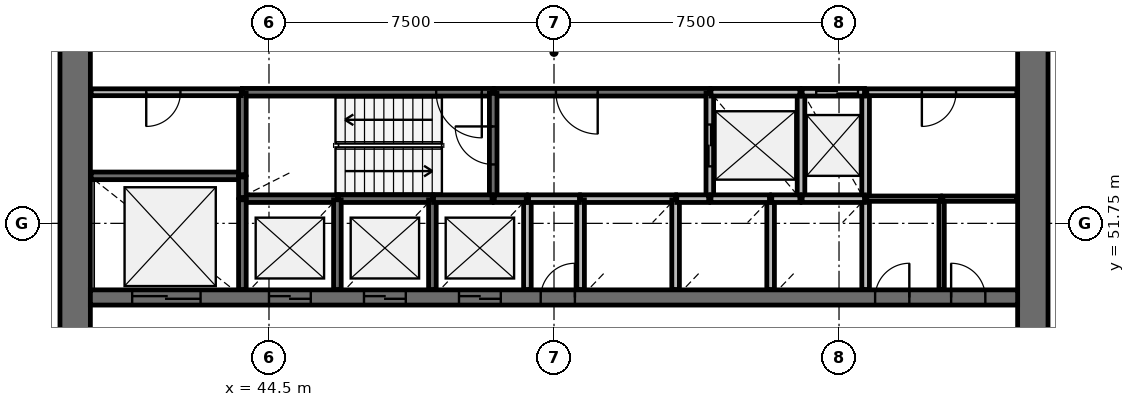
"""IFC4 building model, lengths in metres.
Left out: names, types, materials, properties, quantities, classifications, styles, units other than length and angle.
Written with IfcOpenShell. Run it as: python <this file> out.ifc"""

import sys

from ifc_helpers import new_model, si_unit, direction, frame, frame_2d, origin, place, context, subcontext, project, spatial, rectangle, extrude, source, transform, mapped, element, fill, save


model = new_model("IFC4")
c1 = context("Model", 3, precision=1e-05, world=origin(), true_north=direction((0.0, 1.0)))
c2 = subcontext(c1, "Body", "Model", "MODEL_VIEW")
j1 = project(units=[si_unit("LENGTHUNIT", "METRE"), si_unit("PLANEANGLEUNIT", "RADIAN")], contexts=[c1])
p1 = place(None, origin())
s1 = spatial("IfcSite", under=j1, at=p1, CompositionType="ELEMENT")
p2 = place(p1, origin())
s2 = spatial("IfcBuilding", under=s1, at=p2, CompositionType="ELEMENT")
p3 = place(p2, frame((0.0, 0.0, 112.6)))
s3 = spatial("IfcBuildingStorey", under=s2, at=p3, CompositionType="ELEMENT", Elevation=112.6)
p4 = place(p3, frame((64.6, 38.0, 0.0), z_axis=(0.0, 0.0, 1.0), x_axis=(0.0, 1.0, 0.0)))
e1 = element("IfcWall", 1, at=p4, inside=s3, PredefinedType="SHEAR", context=c2, shape_type="SweptSolid", body=[
    extrude(rectangle(XDim=20.0, YDim=0.8, at=frame_2d((10.0, 0.0))), origin(), (0.0, 0.0, 1.0), 4.1),
])
p5 = place(p4, frame((9.1, 0.0, 0.0)))
e2 = element("IfcOpeningElement", 2, at=p5, cuts=e1, PredefinedType="OPENING", context=c2, shape_type="SweptSolid", body=[
    extrude(rectangle(XDim=1.8, YDim=2.1, at=frame_2d((0.9, 1.05))), frame((0.0, 0.41, 0.0), z_axis=(0.0, -1.0, 0.0), x_axis=(1.0, 0.0, 0.0)), (0.0, 0.0, 1.0), 0.82),
])
p6 = place(p3, frame((39.4, 58.0, 0.0), z_axis=(0.0, 0.0, 1.0), x_axis=(0.0, -1.0, 0.0)))
e3 = element("IfcWall", 3, at=p6, inside=s3, PredefinedType="SHEAR", context=c2, shape_type="SweptSolid", body=[
    extrude(rectangle(XDim=20.0, YDim=0.8, at=frame_2d((10.0, 0.0))), origin(), (0.0, 0.0, 1.0), 4.1),
])
p7 = place(p6, frame((9.1, 0.0, 0.0)))
e4 = element("IfcOpeningElement", 4, at=p7, cuts=e3, PredefinedType="OPENING", context=c2, shape_type="SweptSolid", body=[
    extrude(rectangle(XDim=1.8, YDim=2.1, at=frame_2d((0.9, 1.05))), frame((0.0, 0.41, 0.0), z_axis=(0.0, -1.0, 0.0), x_axis=(1.0, 0.0, 0.0)), (0.0, 0.0, 1.0), 0.82),
])
p8 = place(p3, frame((39.8, 49.8, 0.0), z_axis=(0.0, 0.0, 1.0), x_axis=(1.0, 0.0, 0.0)))
e5 = element("IfcWall", 5, at=p8, inside=s3, PredefinedType="SHEAR", context=c2, shape_type="SweptSolid", body=[
    extrude(rectangle(XDim=24.4, YDim=0.4, at=frame_2d((12.2, 0.0))), origin(), (0.0, 0.0, 1.0), 4.1),
])
p9 = place(p8, frame((4.7, 0.0, 0.0)))
e6 = element("IfcOpeningElement", 6, at=p9, cuts=e5, PredefinedType="OPENING", context=c2, shape_type="SweptSolid", body=[
    extrude(rectangle(XDim=1.1, YDim=2.1, at=frame_2d((0.55, 1.05))), frame((0.0, 0.21, 0.0), z_axis=(0.0, -1.0, 0.0), x_axis=(1.0, 0.0, 0.0)), (0.0, 0.0, 1.0), 0.42),
])
p10 = place(p8, frame((7.2, 0.0, 0.0)))
e7 = element("IfcOpeningElement", 7, at=p10, cuts=e5, PredefinedType="OPENING", context=c2, shape_type="SweptSolid", body=[
    extrude(rectangle(XDim=1.1, YDim=2.1, at=frame_2d((0.55, 1.05))), frame((0.0, 0.21, 0.0), z_axis=(0.0, -1.0, 0.0), x_axis=(1.0, 0.0, 0.0)), (0.0, 0.0, 1.0), 0.42),
])
p11 = place(p8, frame((9.7, 0.0, 0.0)))
e8 = element("IfcOpeningElement", 8, at=p11, cuts=e5, PredefinedType="OPENING", context=c2, shape_type="SweptSolid", body=[
    extrude(rectangle(XDim=1.1, YDim=2.1, at=frame_2d((0.55, 1.05))), frame((0.0, 0.21, 0.0), z_axis=(0.0, -1.0, 0.0), x_axis=(1.0, 0.0, 0.0)), (0.0, 0.0, 1.0), 0.42),
])
p12 = place(p8, frame((1.1, 0.0, 0.0)))
e9 = element("IfcOpeningElement", 9, at=p12, cuts=e5, PredefinedType="OPENING", context=c2, shape_type="SweptSolid", body=[
    extrude(rectangle(XDim=1.8, YDim=2.4, at=frame_2d((0.9, 1.2))), frame((0.0, 0.21, 0.0), z_axis=(0.0, -1.0, 0.0), x_axis=(1.0, 0.0, 0.0)), (0.0, 0.0, 1.0), 0.42),
])
p13 = place(p8, frame((20.65, 0.0, 0.0)))
e10 = element("IfcOpeningElement", 10, at=p13, cuts=e5, PredefinedType="OPENING", context=c2, shape_type="SweptSolid", body=[
    extrude(rectangle(XDim=0.9, YDim=2.1, at=frame_2d((0.45, 1.05))), frame((0.0, 0.21, 0.0), z_axis=(0.0, -1.0, 0.0), x_axis=(1.0, 0.0, 0.0)), (0.0, 0.0, 1.0), 0.42),
])
p14 = place(p8, frame((22.65, 0.0, 0.0)))
e11 = element("IfcOpeningElement", 11, at=p14, cuts=e5, PredefinedType="OPENING", context=c2, shape_type="SweptSolid", body=[
    extrude(rectangle(XDim=0.9, YDim=2.1, at=frame_2d((0.45, 1.05))), frame((0.0, 0.21, 0.0), z_axis=(0.0, -1.0, 0.0), x_axis=(1.0, 0.0, 0.0)), (0.0, 0.0, 1.0), 0.42),
])
p15 = place(p8, frame((11.85, 0.0, 0.0)))
e12 = element("IfcOpeningElement", 12, at=p15, cuts=e5, PredefinedType="OPENING", context=c2, shape_type="SweptSolid", body=[
    extrude(rectangle(XDim=0.9, YDim=2.1, at=frame_2d((0.45, 1.05))), frame((0.0, 0.21, 0.0), z_axis=(0.0, -1.0, 0.0), x_axis=(1.0, 0.0, 0.0)), (0.0, 0.0, 1.0), 0.42),
])
p16 = place(p3, frame((50.4, 55.2, 0.0), z_axis=(0.0, 0.0, 1.0), x_axis=(-1.0, 0.0, 0.0)))
e13 = element("IfcWall", 13, at=p16, inside=s3, PredefinedType="SOLIDWALL", context=c2, shape_type="SweptSolid", body=[
    extrude(rectangle(XDim=6.6, YDim=0.2, at=frame_2d((3.3, 0.0))), origin(), (0.0, 0.0, 1.0), 3.7),
])
p17 = place(p16, frame((0.3, 0.0, 0.0)))
e14 = element("IfcOpeningElement", 14, at=p17, cuts=e13, PredefinedType="OPENING", context=c2, shape_type="SweptSolid", body=[
    extrude(rectangle(XDim=1.2, YDim=2.1, at=frame_2d((0.6, 1.05))), frame((0.0, 0.11, 0.0), z_axis=(0.0, -1.0, 0.0), x_axis=(1.0, 0.0, 0.0)), (0.0, 0.0, 1.0), 0.22),
])
p18 = place(p3, frame((56.1, 55.2, 0.0), z_axis=(0.0, 0.0, 1.0), x_axis=(-1.0, 0.0, 0.0)))
e15 = element("IfcWall", 15, at=p18, inside=s3, PredefinedType="SOLIDWALL", context=c2, shape_type="SweptSolid", body=[
    extrude(rectangle(XDim=5.67, YDim=0.2, at=frame_2d((2.835, 0.0))), origin(), (0.0, 0.0, 1.0), 3.7),
])
p19 = place(p18, frame((2.95, 0.0, 0.0)))
e16 = element("IfcOpeningElement", 16, at=p19, cuts=e15, PredefinedType="OPENING", context=c2, shape_type="SweptSolid", body=[
    extrude(rectangle(XDim=1.1, YDim=2.1, at=frame_2d((0.55, 1.05))), frame((0.0, 0.11, 0.0), z_axis=(0.0, -1.0, 0.0), x_axis=(1.0, 0.0, 0.0)), (0.0, 0.0, 1.0), 0.22),
])
p20 = place(p3, frame((43.8, 53.0, 0.0), z_axis=(0.0, 0.0, 1.0), x_axis=(-1.0, 0.0, 0.0)))
e17 = element("IfcWall", 17, at=p20, inside=s3, PredefinedType="SOLIDWALL", context=c2, shape_type="SweptSolid", body=[
    extrude(rectangle(XDim=3.98, YDim=0.2, at=frame_2d((1.99, 0.0))), origin(), (0.0, 0.0, 1.0), 3.7),
])
p21 = place(p3, frame((50.4, 52.4, 0.0), z_axis=(0.0, 0.0, 1.0), x_axis=(0.0, 1.0, 0.0)))
e18 = element("IfcWall", 18, at=p21, inside=s3, PredefinedType="SOLIDWALL", context=c2, shape_type="SweptSolid", body=[
    extrude(rectangle(XDim=2.77, YDim=0.2, at=frame_2d((1.385, 0.0))), origin(), (0.0, 0.0, 1.0), 3.7),
])
p22 = place(p21, frame((0.9, 0.0, 0.0)))
e19 = element("IfcOpeningElement", 19, at=p22, cuts=e18, PredefinedType="OPENING", context=c2, shape_type="SweptSolid", body=[
    extrude(rectangle(XDim=1.0, YDim=2.1, at=frame_2d((0.5, 1.05))), frame((0.0, 0.11, 0.0), z_axis=(0.0, -1.0, 0.0), x_axis=(1.0, 0.0, 0.0)), (0.0, 0.0, 1.0), 0.22),
])
p23 = place(p3, frame((56.1, 55.17, 0.0), z_axis=(0.0, 0.0, 1.0), x_axis=(0.0, -1.0, 0.0)))
e20 = element("IfcWall", 20, at=p23, inside=s3, PredefinedType="SOLIDWALL", context=c2, shape_type="SweptSolid", body=[
    extrude(rectangle(XDim=2.77, YDim=0.2, at=frame_2d((1.385, 0.0))), origin(), (0.0, 0.0, 1.0), 3.7),
])
p24 = place(p23, frame((0.82, 0.0, 0.0)))
e21 = element("IfcOpeningElement", 21, at=p24, cuts=e20, PredefinedType="OPENING", context=c2, shape_type="SweptSolid", body=[
    extrude(rectangle(XDim=1.1, YDim=2.1, at=frame_2d((0.55, 1.05))), frame((0.0, 0.11, 0.0), z_axis=(0.0, -1.0, 0.0), x_axis=(1.0, 0.0, 0.0)), (0.0, 0.0, 1.0), 0.22),
])
for number, where, z_axis, x_axis in (
    (22, (58.5, 52.4, 0.0), (0.0, 0.0, 1.0), (0.0, 1.0, 0.0)),
    (23, (60.2, 52.4, 0.0), (0.0, 0.0, 1.0), (0.0, 1.0, 0.0)),
):
    element("IfcWall", number, at=place(p3, frame(where, z_axis=z_axis, x_axis=x_axis)), inside=s3, PredefinedType="SOLIDWALL", context=c2, shape_type="SweptSolid", body=[
        extrude(rectangle(XDim=2.8, YDim=0.2, at=frame_2d((1.4, 0.0))), origin(), (0.0, 0.0, 1.0), 3.7),
    ])
p25 = place(p3, frame((46.3, 52.4, 0.0), z_axis=(0.0, 0.0, 1.0), x_axis=(-1.0, 0.0, 0.0)))
e24 = element("IfcWall", 24, at=p25, inside=s3, PredefinedType="SOLIDWALL", context=c2, shape_type="SweptSolid", body=[
    extrude(rectangle(XDim=2.5, YDim=0.2, at=frame_2d((1.25, 0.0))), origin(), (0.0, 0.0, 1.0), 3.7),
])
p26 = place(p3, frame((48.8, 52.4, 0.0), z_axis=(0.0, 0.0, 1.0), x_axis=(-1.0, 0.0, 0.0)))
e25 = element("IfcWall", 25, at=p26, inside=s3, PredefinedType="SOLIDWALL", context=c2, shape_type="SweptSolid", body=[
    extrude(rectangle(XDim=2.47, YDim=0.2, at=frame_2d((1.235, 0.0))), origin(), (0.0, 0.0, 1.0), 3.7),
])
p27 = place(p3, frame((55.2, 52.4, 0.0), z_axis=(0.0, 0.0, 1.0), x_axis=(-1.0, 0.0, 0.0)))
e26 = element("IfcWall", 26, at=p27, inside=s3, PredefinedType="SOLIDWALL", context=c2, shape_type="SweptSolid", body=[
    extrude(rectangle(XDim=2.5, YDim=0.2, at=frame_2d((1.25, 0.0))), origin(), (0.0, 0.0, 1.0), 3.7),
])
p28 = place(p3, frame((58.47, 55.2, 0.0), z_axis=(0.0, 0.0, 1.0), x_axis=(-1.0, 0.0, 0.0)))
e27 = element("IfcWall", 27, at=p28, inside=s3, PredefinedType="SOLIDWALL", context=c2, shape_type="SweptSolid", body=[
    extrude(rectangle(XDim=2.34, YDim=0.2, at=frame_2d((1.17, 0.0))), origin(), (0.0, 0.0, 1.0), 3.7),
])
for number, where, z_axis, x_axis in (
    (28, (43.8, 52.37, 0.0), (0.0, 0.0, 1.0), (0.0, -1.0, 0.0)),
    (29, (46.3, 50.01, 0.0), (0.0, 0.0, 1.0), (0.0, 1.0, 0.0)),
    (30, (48.8, 50.01, 0.0), (0.0, 0.0, 1.0), (0.0, 1.0, 0.0)),
):
    element("IfcWall", number, at=place(p3, frame(where, z_axis=z_axis, x_axis=x_axis)), inside=s3, PredefinedType="SOLIDWALL", context=c2, shape_type="SweptSolid", body=[
        extrude(rectangle(XDim=2.36, YDim=0.2, at=frame_2d((1.18, 0.0))), origin(), (0.0, 0.0, 1.0), 3.7),
    ])
p29 = place(p3, frame((51.3, 50.01, 0.0), z_axis=(0.0, 0.0, 1.0), x_axis=(0.0, 1.0, 0.0)))
e31 = element("IfcWall", 31, at=p29, inside=s3, PredefinedType="SOLIDWALL", context=c2, shape_type="SweptSolid", body=[
    extrude(rectangle(XDim=2.39, YDim=0.2, at=frame_2d((1.195, 0.0))), origin(), (0.0, 0.0, 1.0), 3.7),
])
for number, where, z_axis, x_axis in (
    (32, (52.7, 52.37, 0.0), (0.0, 0.0, 1.0), (0.0, -1.0, 0.0)),
    (33, (55.2, 50.01, 0.0), (0.0, 0.0, 1.0), (0.0, 1.0, 0.0)),
):
    element("IfcWall", number, at=place(p3, frame(where, z_axis=z_axis, x_axis=x_axis)), inside=s3, PredefinedType="SOLIDWALL", context=c2, shape_type="SweptSolid", body=[
        extrude(rectangle(XDim=2.36, YDim=0.2, at=frame_2d((1.18, 0.0))), origin(), (0.0, 0.0, 1.0), 3.7),
    ])
p30 = place(p3, frame((57.7, 50.01, 0.0), z_axis=(0.0, 0.0, 1.0), x_axis=(0.0, 1.0, 0.0)))
e34 = element("IfcWall", 34, at=p30, inside=s3, PredefinedType="SOLIDWALL", context=c2, shape_type="SweptSolid", body=[
    extrude(rectangle(XDim=2.39, YDim=0.2, at=frame_2d((1.195, 0.0))), origin(), (0.0, 0.0, 1.0), 3.7),
])
p31 = place(p3, frame((60.2, 50.01, 0.0), z_axis=(0.0, 0.0, 1.0), x_axis=(0.0, 1.0, 0.0)))
e35 = element("IfcWall", 35, at=p31, inside=s3, PredefinedType="SOLIDWALL", context=c2, shape_type="SweptSolid", body=[
    extrude(rectangle(XDim=2.36, YDim=0.2, at=frame_2d((1.18, 0.0))), origin(), (0.0, 0.0, 1.0), 3.7),
])
p32 = place(p3, frame((43.8, 55.17, 0.0), z_axis=(0.0, 0.0, 1.0), x_axis=(0.0, -1.0, 0.0)))
e36 = element("IfcWall", 36, at=p32, inside=s3, PredefinedType="SOLIDWALL", context=c2, shape_type="SweptSolid", body=[
    extrude(rectangle(XDim=2.14, YDim=0.2, at=frame_2d((1.07, 0.0))), origin(), (0.0, 0.0, 1.0), 3.7),
])
p33 = place(p3, frame((60.17, 52.4, 0.0), z_axis=(0.0, 0.0, 1.0), x_axis=(-1.0, 0.0, 0.0)))
e37 = element("IfcWall", 37, at=p33, inside=s3, PredefinedType="SOLIDWALL", context=c2, shape_type="SweptSolid", body=[
    extrude(rectangle(XDim=1.64, YDim=0.2, at=frame_2d((0.82, 0.0))), origin(), (0.0, 0.0, 1.0), 3.7),
])
p34 = place(p3, frame((60.17, 55.2, 0.0), z_axis=(0.0, 0.0, 1.0), x_axis=(-1.0, 0.0, 0.0)))
e38 = element("IfcWall", 38, at=p34, inside=s3, PredefinedType="SOLIDWALL", context=c2, shape_type="SweptSolid", body=[
    extrude(rectangle(XDim=1.64, YDim=0.2, at=frame_2d((0.82, 0.0))), origin(), (0.0, 0.0, 1.0), 3.7),
])
p35 = place(p34, frame((0.17, 0.0, 0.0)))
e39 = element("IfcOpeningElement", 39, at=p35, cuts=e38, PredefinedType="OPENING", context=c2, shape_type="SweptSolid", body=[
    extrude(rectangle(XDim=1.1, YDim=2.1, at=frame_2d((0.55, 1.05))), frame((0.0, 0.11, 0.0), z_axis=(0.0, -1.0, 0.0), x_axis=(1.0, 0.0, 0.0)), (0.0, 0.0, 1.0), 0.22),
])
for number, where, z_axis, x_axis in (
    (40, (50.37, 52.4, 0.0), (0.0, 0.0, 1.0), (-1.0, 0.0, 0.0)),
    (41, (57.67, 52.4, 0.0), (0.0, 0.0, 1.0), (-1.0, 0.0, 0.0)),
):
    element("IfcWall", number, at=place(p3, frame(where, z_axis=z_axis, x_axis=x_axis)), inside=s3, PredefinedType="SOLIDWALL", context=c2, shape_type="SweptSolid", body=[
        extrude(rectangle(XDim=1.54, YDim=0.2, at=frame_2d((0.77, 0.0))), origin(), (0.0, 0.0, 1.0), 3.7),
    ])
p36 = place(p3, frame((51.33, 52.4, 0.0), z_axis=(0.0, 0.0, 1.0), x_axis=(1.0, 0.0, 0.0)))
e42 = element("IfcWall", 42, at=p36, inside=s3, PredefinedType="SOLIDWALL", context=c2, shape_type="SweptSolid", body=[
    extrude(rectangle(XDim=1.34, YDim=0.2, at=frame_2d((0.67, 0.0))), origin(), (0.0, 0.0, 1.0), 3.7),
])
for number, where, z_axis, x_axis in (
    (43, (51.27, 52.4, 0.0), (0.0, 0.0, 1.0), (-1.0, 0.0, 0.0)),
    (44, (56.07, 52.4, 0.0), (0.0, 0.0, 1.0), (-1.0, 0.0, 0.0)),
):
    element("IfcWall", number, at=place(p3, frame(where, z_axis=z_axis, x_axis=x_axis)), inside=s3, PredefinedType="SOLIDWALL", context=c2, shape_type="SweptSolid", body=[
        extrude(rectangle(XDim=0.84, YDim=0.2, at=frame_2d((0.42, 0.0))), origin(), (0.0, 0.0, 1.0), 3.7),
    ])
p37 = place(p3, frame((58.47, 52.4, 0.0), z_axis=(0.0, 0.0, 1.0), x_axis=(-1.0, 0.0, 0.0)))
e45 = element("IfcWall", 45, at=p37, inside=s3, PredefinedType="SOLIDWALL", context=c2, shape_type="SweptSolid", body=[
    extrude(rectangle(XDim=0.74, YDim=0.2, at=frame_2d((0.37, 0.0))), origin(), (0.0, 0.0, 1.0), 3.7),
])
p38 = place(p3, frame((43.8, 52.43, 0.0), z_axis=(0.0, 0.0, 1.0), x_axis=(0.0, 1.0, 0.0)))
e46 = element("IfcWall", 46, at=p38, inside=s3, PredefinedType="SOLIDWALL", context=c2, shape_type="SweptSolid", body=[
    extrude(rectangle(XDim=0.54, YDim=0.2, at=frame_2d((0.27, 0.0))), origin(), (0.0, 0.0, 1.0), 3.7),
])
p39 = place(p3, frame((64.18, 55.2, 0.0), z_axis=(0.0, 0.0, 1.0), x_axis=(-1.0, 0.0, 0.0)))
e47 = element("IfcWall", 47, at=p39, inside=s3, PredefinedType="PARTITIONING", context=c2, shape_type="SweptSolid", body=[
    extrude(rectangle(XDim=3.95, YDim=0.18, at=frame_2d((1.975, 0.0))), origin(), (0.0, 0.0, 1.0), 3.7),
])
p40 = place(p39, frame((1.6, 0.0, 0.0)))
e48 = element("IfcOpeningElement", 48, at=p40, cuts=e47, PredefinedType="OPENING", context=c2, shape_type="SweptSolid", body=[
    extrude(rectangle(XDim=0.9, YDim=2.1, at=frame_2d((0.45, 1.05))), frame((0.0, 0.1, 0.0), z_axis=(0.0, -1.0, 0.0), x_axis=(1.0, 0.0, 0.0)), (0.0, 0.0, 1.0), 0.2),
])
p41 = place(p3, frame((43.77, 55.2, 0.0), z_axis=(0.0, 0.0, 1.0), x_axis=(-1.0, 0.0, 0.0)))
e49 = element("IfcWall", 49, at=p41, inside=s3, PredefinedType="PARTITIONING", context=c2, shape_type="SweptSolid", body=[
    extrude(rectangle(XDim=3.95, YDim=0.18, at=frame_2d((1.975, 0.0))), origin(), (0.0, 0.0, 1.0), 3.7),
])
p42 = place(p41, frame((1.6, 0.0, 0.0)))
e50 = element("IfcOpeningElement", 50, at=p42, cuts=e49, PredefinedType="OPENING", context=c2, shape_type="SweptSolid", body=[
    extrude(rectangle(XDim=0.9, YDim=2.1, at=frame_2d((0.45, 1.05))), frame((0.0, 0.1, 0.0), z_axis=(0.0, -1.0, 0.0), x_axis=(1.0, 0.0, 0.0)), (0.0, 0.0, 1.0), 0.2),
])
p43 = place(p3, frame((62.2, 50.01, 0.0), z_axis=(0.0, 0.0, 1.0), x_axis=(0.0, 1.0, 0.0)))
e51 = element("IfcWall", 51, at=p43, inside=s3, PredefinedType="PARTITIONING", context=c2, shape_type="SweptSolid", body=[
    extrude(rectangle(XDim=2.39, YDim=0.14, at=frame_2d((1.195, 0.0))), origin(), (0.0, 0.0, 1.0), 2.9),
])
p44 = place(p3, frame((62.17, 52.4, 0.0), z_axis=(0.0, 0.0, 1.0), x_axis=(-1.0, 0.0, 0.0)))
e52 = element("IfcWall", 52, at=p44, inside=s3, PredefinedType="PARTITIONING", context=c2, shape_type="SweptSolid", body=[
    extrude(rectangle(XDim=1.94, YDim=0.14, at=frame_2d((0.97, 0.0))), origin(), (0.0, 0.0, 1.0), 2.9),
])
p45 = place(p3, frame((64.18, 52.4, 0.0), z_axis=(0.0, 0.0, 1.0), x_axis=(-1.0, 0.0, 0.0)))
e53 = element("IfcWall", 53, at=p45, inside=s3, PredefinedType="PARTITIONING", context=c2, shape_type="SweptSolid", body=[
    extrude(rectangle(XDim=1.95, YDim=0.14, at=frame_2d((0.975, 0.0))), origin(), (0.0, 0.0, 1.0), 2.9),
])
m1 = source(origin(), c2, "Body", "SweptSolid", [
    extrude(rectangle(XDim=1.1, YDim=2.1, at=frame_2d((0.55, 1.05))), frame((0.0, 0.025, 0.0), z_axis=(0.0, -1.0, 0.0), x_axis=(1.0, 0.0, 0.0)), (0.0, 0.0, 1.0), 0.05),
])
p46 = place(p9, origin())
e54 = element("IfcDoor", 54, at=p46, inside=s3, OperationType="DOUBLE_DOOR_SLIDING", PredefinedType="USERDEFINED", context=c2, shape_type="MappedRepresentation", body=[
    mapped(m1, transform((0.0, 0.0, 0.0), scale=1.0)),
])
fill(e6, e54)
p47 = place(p10, origin())
e55 = element("IfcDoor", 55, at=p47, inside=s3, OperationType="DOUBLE_DOOR_SLIDING", PredefinedType="USERDEFINED", context=c2, shape_type="MappedRepresentation", body=[
    mapped(m1, transform((0.0, 0.0, 0.0), scale=1.0)),
])
fill(e7, e55)
p48 = place(p11, origin())
e56 = element("IfcDoor", 56, at=p48, inside=s3, OperationType="DOUBLE_DOOR_SLIDING", PredefinedType="USERDEFINED", context=c2, shape_type="MappedRepresentation", body=[
    mapped(m1, transform((0.0, 0.0, 0.0), scale=1.0)),
])
fill(e8, e56)
p49 = place(p24, origin())
e57 = element("IfcDoor", 57, at=p49, inside=s3, OperationType="DOUBLE_DOOR_SLIDING", PredefinedType="USERDEFINED", context=c2, shape_type="MappedRepresentation", body=[
    mapped(m1, transform((0.0, 0.0, 0.0), scale=1.0)),
])
fill(e21, e57)
p50 = place(p35, origin())
e58 = element("IfcDoor", 58, at=p50, inside=s3, OperationType="DOUBLE_DOOR_SLIDING", PredefinedType="USERDEFINED", context=c2, shape_type="MappedRepresentation", body=[
    mapped(m1, transform((0.0, 0.0, 0.0), scale=1.0)),
])
fill(e39, e58)
m2 = source(origin(), c2, "Body", "SweptSolid", [
    extrude(rectangle(XDim=1.8, YDim=2.4, at=frame_2d((0.9, 1.2))), frame((0.0, 0.025, 0.0), z_axis=(0.0, -1.0, 0.0), x_axis=(1.0, 0.0, 0.0)), (0.0, 0.0, 1.0), 0.05),
])
p51 = place(p12, origin())
e59 = element("IfcDoor", 59, at=p51, inside=s3, OperationType="DOUBLE_DOOR_SLIDING", PredefinedType="USERDEFINED", context=c2, shape_type="MappedRepresentation", body=[
    mapped(m2, transform((0.0, 0.0, 0.0), scale=1.0)),
])
fill(e9, e59)
m3 = source(origin(), c2, "Body", "SweptSolid", [
    extrude(rectangle(XDim=1.2, YDim=2.1, at=frame_2d((0.6, 1.05))), frame((0.0, 0.025, 0.0), z_axis=(0.0, -1.0, 0.0), x_axis=(1.0, 0.0, 0.0)), (0.0, 0.0, 1.0), 0.05),
])
p52 = place(p17, origin())
e60 = element("IfcDoor", 60, at=p52, inside=s3, OperationType="SINGLE_SWING_LEFT", PredefinedType="DOOR", context=c2, shape_type="MappedRepresentation", body=[
    mapped(m3, transform((0.0, 0.0, 0.0), scale=1.0)),
])
fill(e14, e60)
m4 = source(origin(), c2, "Body", "SweptSolid", [
    extrude(rectangle(XDim=1.0, YDim=2.1, at=frame_2d((0.5, 1.05))), frame((0.0, 0.025, 0.0), z_axis=(0.0, -1.0, 0.0), x_axis=(1.0, 0.0, 0.0)), (0.0, 0.0, 1.0), 0.05),
])
p53 = place(p22, origin())
e61 = element("IfcDoor", 61, at=p53, inside=s3, OperationType="SINGLE_SWING_RIGHT", PredefinedType="DOOR", context=c2, shape_type="MappedRepresentation", body=[
    mapped(m4, transform((0.0, 0.0, 0.0), scale=1.0)),
])
fill(e19, e61)
m5 = source(origin(), c2, "Body", "SweptSolid", [
    extrude(rectangle(XDim=1.1, YDim=2.1, at=frame_2d((0.55, 1.05))), frame((0.0, 0.025, 0.0), z_axis=(0.0, -1.0, 0.0), x_axis=(1.0, 0.0, 0.0)), (0.0, 0.0, 1.0), 0.05),
])
p54 = place(p19, origin())
e62 = element("IfcDoor", 62, at=p54, inside=s3, OperationType="SINGLE_SWING_LEFT", PredefinedType="DOOR", context=c2, shape_type="MappedRepresentation", body=[
    mapped(m5, transform((0.0, 0.0, 0.0), scale=1.0)),
])
fill(e16, e62)
m6 = source(origin(), c2, "Body", "SweptSolid", [
    extrude(rectangle(XDim=0.9, YDim=2.1, at=frame_2d((0.45, 1.05))), frame((0.0, 0.025, 0.0), z_axis=(0.0, -1.0, 0.0), x_axis=(1.0, 0.0, 0.0)), (0.0, 0.0, 1.0), 0.05),
])
p55 = place(p42, origin())
e63 = element("IfcDoor", 63, at=p55, inside=s3, OperationType="SINGLE_SWING_RIGHT", PredefinedType="DOOR", context=c2, shape_type="MappedRepresentation", body=[
    mapped(m6, transform((0.0, 0.0, 0.0), scale=1.0)),
])
fill(e50, e63)
p56 = place(p13, origin())
e64 = element("IfcDoor", 64, at=p56, inside=s3, OperationType="SINGLE_SWING_RIGHT", PredefinedType="DOOR", context=c2, shape_type="MappedRepresentation", body=[
    mapped(m6, transform((0.0, 0.0, 0.0), scale=1.0)),
])
fill(e10, e64)
p57 = place(p14, origin())
e65 = element("IfcDoor", 65, at=p57, inside=s3, OperationType="SINGLE_SWING_LEFT", PredefinedType="DOOR", context=c2, shape_type="MappedRepresentation", body=[
    mapped(m6, transform((0.0, 0.0, 0.0), scale=1.0)),
])
fill(e11, e65)
p58 = place(p40, origin())
e66 = element("IfcDoor", 66, at=p58, inside=s3, OperationType="SINGLE_SWING_RIGHT", PredefinedType="DOOR", context=c2, shape_type="MappedRepresentation", body=[
    mapped(m6, transform((0.0, 0.0, 0.0), scale=1.0)),
])
fill(e48, e66)
p59 = place(p15, origin())
e67 = element("IfcDoor", 67, at=p59, inside=s3, OperationType="SINGLE_SWING_RIGHT", PredefinedType="DOOR", context=c2, shape_type="MappedRepresentation", body=[
    mapped(m6, transform((0.0, 0.0, 0.0), scale=1.0)),
])
fill(e12, e67)
save(model, sys.argv[1])
